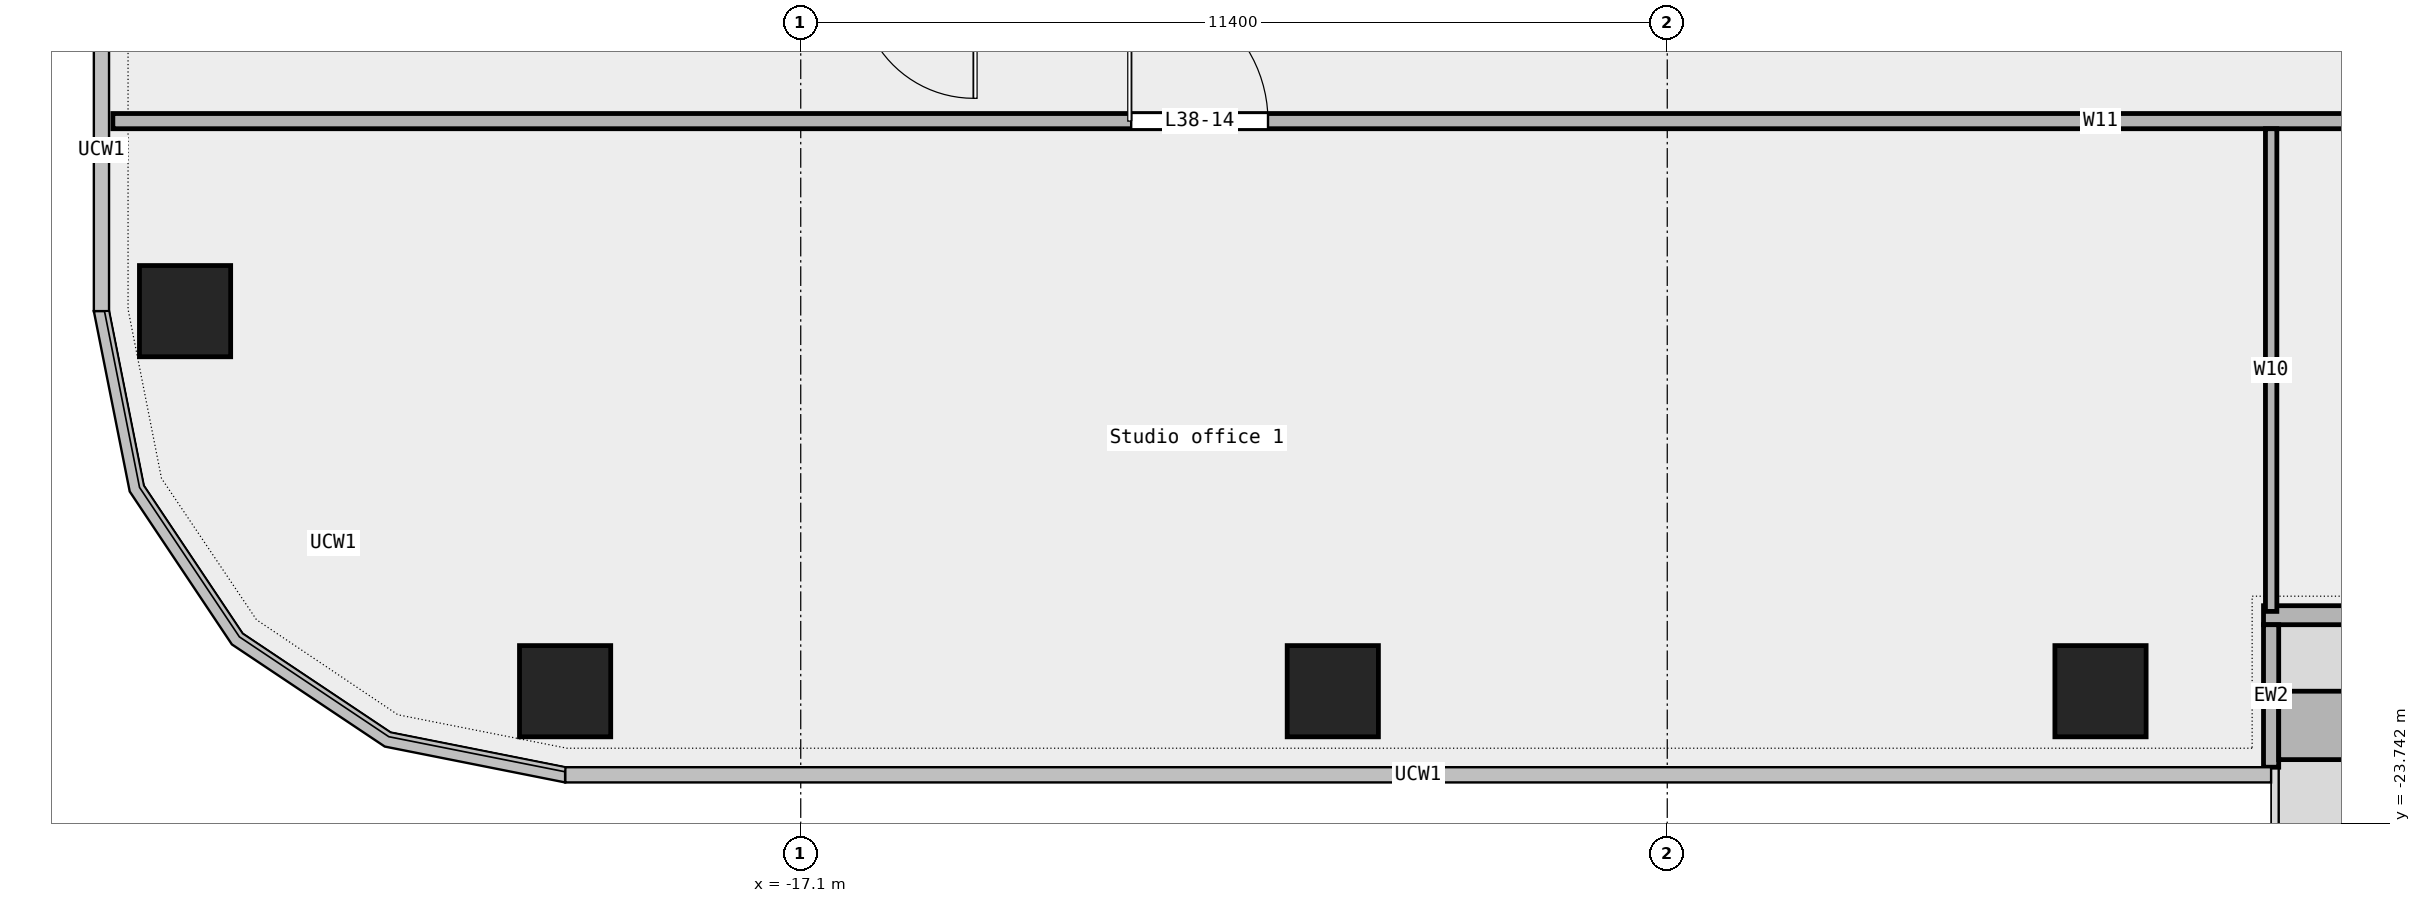
"""IFC4 building model, lengths in metres.
Left out: names, types, materials, properties, quantities, classifications, styles, units other than length and angle.
Written with IfcOpenShell. Run it as: python <this file> out.ifc"""

import sys

from ifc_helpers import new_model, si_unit, direction, frame, frame_2d, origin, origin_2d, place, context, subcontext, project, spatial, rectangle, extrude, element, fill, save


model = new_model("IFC4")
c1 = context("Model", 3, precision=1e-05, world=origin(), true_north=direction((0.0, 1.0)))
c2 = subcontext(c1, "Body", "Model", "MODEL_VIEW")
j1 = project(units=[si_unit("LENGTHUNIT", "METRE"), si_unit("PLANEANGLEUNIT", "RADIAN")], contexts=[c1])
p1 = place(None, origin())
s1 = spatial("IfcSite", under=j1, at=p1, CompositionType="ELEMENT")
p2 = place(p1, origin())
s2 = spatial("IfcBuilding", under=s1, at=p2, CompositionType="ELEMENT")
p3 = place(p2, frame((0.0, 0.0, 185.0)))
s3 = spatial("IfcBuildingStorey", under=s2, at=p3, CompositionType="ELEMENT", Elevation=185.0)
for number, where, z_axis, x_axis in (
    (1, (-20.2, -22.0, 0.0), (0.0, 0.0, 1.0), (1.0, 0.0, 0.0)),
    (2, (-10.1, -22.0, 0.0), (0.0, 0.0, 1.0), (1.0, 0.0, 0.0)),
    (3, (0.0, -22.0, 0.0), (0.0, 0.0, 1.0), (1.0, 0.0, 0.0)),
    (4, (-25.2, -17.0, 0.0), (0.0, 0.0, 1.0), (1.0, 0.0, 0.0)),
):
    element("IfcColumn", number, at=place(p3, frame(where, z_axis=z_axis, x_axis=x_axis)), inside=s3, PredefinedType="COLUMN", context=c2, shape_type="SweptSolid", body=[
        extrude(rectangle(XDim=1.2, YDim=1.2, at=origin_2d()), origin(), (0.0, 0.0, 1.0), 3.6),
    ])
p4 = place(p3, frame((2.145, -21.0, 0.0), z_axis=(0.0, 0.0, 1.0), x_axis=(1.0, 0.0, 0.0)))
e5 = element("IfcWall", 5, at=p4, inside=s3, PredefinedType="STANDARD", context=c2, shape_type="SweptSolid", body=[
    extrude(rectangle(XDim=13.667, YDim=0.25, at=frame_2d((6.833, 0.0))), origin(), (0.0, 0.0, 1.0), 3.6),
])
p5 = place(p4, frame((1.75, 0.0, 0.45)))
e6 = element("IfcOpeningElement", 6, at=p5, cuts=e5, PredefinedType="OPENING", context=c2, shape_type="SweptSolid", body=[
    extrude(rectangle(XDim=1.5, YDim=2.4, at=frame_2d((0.75, 1.2))), frame((0.0, 0.137, 0.0), z_axis=(0.0, -1.0, 0.0), x_axis=(1.0, 0.0, 0.0)), (0.0, 0.0, 1.0), 0.274),
])
p6 = place(p4, frame((5.25, 0.0, 0.0)))
e7 = element("IfcOpeningElement", 7, at=p6, cuts=e5, PredefinedType="OPENING", context=c2, shape_type="SweptSolid", body=[
    extrude(rectangle(XDim=1.8, YDim=2.4, at=frame_2d((0.9, 1.2))), frame((0.0, 0.137, 0.0), z_axis=(0.0, -1.0, 0.0), x_axis=(1.0, 0.0, 0.0)), (0.0, 0.0, 1.0), 0.274),
])
p7 = place(p4, frame((10.5, 0.0, 0.45)))
e8 = element("IfcOpeningElement", 8, at=p7, cuts=e5, PredefinedType="OPENING", context=c2, shape_type="SweptSolid", body=[
    extrude(rectangle(XDim=1.5, YDim=2.4, at=frame_2d((0.75, 1.2))), frame((0.0, 0.137, 0.0), z_axis=(0.0, -1.0, 0.0), x_axis=(1.0, 0.0, 0.0)), (0.0, 0.0, 1.0), 0.274),
])
p8 = place(p3, frame((2.244, -23.0, 0.0), z_axis=(0.0, 0.0, 1.0), x_axis=(0.0, 1.0, 0.0)))
e9 = element("IfcWall", 9, at=p8, inside=s3, PredefinedType="STANDARD", context=c2, shape_type="SweptSolid", body=[
    extrude(rectangle(XDim=1.875, YDim=0.2, at=frame_2d((0.938, 0.0))), origin(), (0.0, 0.0, 1.0), 3.6),
])
p9 = place(p3, frame((2.344, -22.45, 0.0), z_axis=(0.0, 0.0, 1.0), x_axis=(1.0, 0.0, 0.0)))
e10 = element("IfcWall", 10, at=p9, inside=s3, PredefinedType="STANDARD", context=c2, shape_type="SweptSolid", body=[
    extrude(rectangle(XDim=3.6, YDim=0.9, at=frame_2d((1.8, 0.0))), origin(), (0.0, 0.0, 1.0), 0.7),
])
p10 = place(p3, frame((-26.15, -14.5, 0.0), z_axis=(0.0, 0.0, 1.0), x_axis=(1.0, 0.0, 0.0)))
e11 = element("IfcWall", 11, at=p10, inside=s3, PredefinedType="PARTITIONING", context=c2, shape_type="SweptSolid", body=[
    extrude(rectangle(XDim=52.3, YDim=0.2, at=frame_2d((26.15, 0.0))), origin(), (0.0, 0.0, 1.0), 3.6),
])
p11 = place(p10, frame((34.528, 0.0, 0.0)))
e12 = element("IfcOpeningElement", 12, at=p11, cuts=e11, PredefinedType="OPENING", context=c2, shape_type="SweptSolid", body=[
    extrude(rectangle(XDim=1.2, YDim=2.1, at=frame_2d((0.6, 1.05))), frame((0.0, 0.112, 0.0), z_axis=(0.0, -1.0, 0.0), x_axis=(1.0, 0.0, 0.0)), (0.0, 0.0, 1.0), 0.224),
])
p12 = place(p10, frame((13.397, 0.0, 0.0)))
e13 = element("IfcOpeningElement", 13, at=p12, cuts=e11, PredefinedType="OPENING", context=c2, shape_type="SweptSolid", body=[
    extrude(rectangle(XDim=1.8, YDim=2.1, at=frame_2d((0.9, 1.05))), frame((0.0, 0.112, 0.0), z_axis=(0.0, -1.0, 0.0), x_axis=(1.0, 0.0, 0.0)), (0.0, 0.0, 1.0), 0.224),
])
p13 = place(p10, frame((46.38, 0.0, 0.0)))
e14 = element("IfcOpeningElement", 14, at=p13, cuts=e11, PredefinedType="OPENING", context=c2, shape_type="SweptSolid", body=[
    extrude(rectangle(XDim=1.2, YDim=2.1, at=frame_2d((0.6, 1.05))), frame((0.0, 0.112, 0.0), z_axis=(0.0, -1.0, 0.0), x_axis=(1.0, 0.0, 0.0)), (0.0, 0.0, 1.0), 0.224),
])
p14 = place(p3, frame((2.245, -20.95, 0.0), z_axis=(0.0, 0.0, 1.0), x_axis=(0.0, 1.0, 0.0)))
e15 = element("IfcWall", 15, at=p14, inside=s3, PredefinedType="PARTITIONING", context=c2, shape_type="SweptSolid", body=[
    extrude(rectangle(XDim=6.35, YDim=0.15, at=frame_2d((3.175, 0.0))), origin(), (0.0, 0.0, 1.0), 3.6),
])
p15 = place(p12, origin())
e16 = element("IfcDoor", 16, at=p15, inside=s3, OperationType="DOUBLE_DOOR_SINGLE_SWING", PredefinedType="DOOR", context=c2, shape_type="SweptSolid", body=[
    extrude(rectangle(XDim=1.8, YDim=2.1, at=frame_2d((0.9, 1.05))), frame((0.0, 0.025, 0.0), z_axis=(0.0, -1.0, 0.0), x_axis=(1.0, 0.0, 0.0)), (0.0, 0.0, 1.0), 0.05),
])
fill(e13, e16)
save(model, sys.argv[1])
